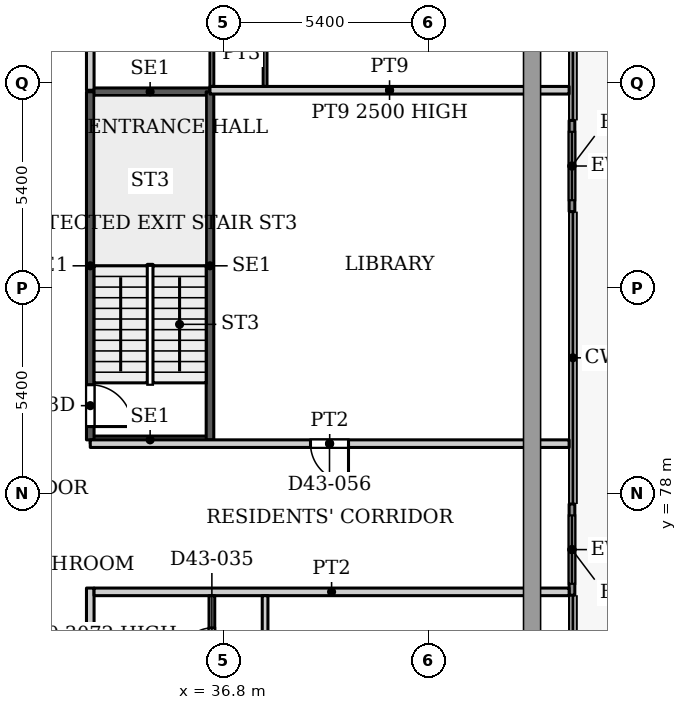
"""IFC4 building model, lengths in metres.
Left out: names, types, materials, properties, quantities, classifications, styles, units other than length and angle.
Written with IfcOpenShell. Run it as: python <this file> out.ifc"""

import sys

from ifc_helpers import new_model, si_unit, direction, frame, frame_2d, origin, place, context, subcontext, project, spatial, rectangle, extrude, source, transform, mapped, element, fill, save


model = new_model("IFC4")
c1 = context("Model", 3, precision=1e-05, world=origin(), true_north=direction((0.0, 1.0)))
c2 = subcontext(c1, "Body", "Model", "MODEL_VIEW")
j1 = project(units=[si_unit("LENGTHUNIT", "METRE"), si_unit("PLANEANGLEUNIT", "RADIAN")], contexts=[c1])
p1 = place(None, origin())
s1 = spatial("IfcSite", under=j1, at=p1, CompositionType="ELEMENT")
p2 = place(p1, origin())
s2 = spatial("IfcBuilding", under=s1, at=p2, CompositionType="ELEMENT")
p3 = place(p2, frame((0.0, 0.0, 191.6)))
s3 = spatial("IfcBuildingStorey", under=s2, at=p3, CompositionType="ELEMENT", Elevation=191.6)
p4 = place(p3, frame((45.975, 87.806, 0.0), z_axis=(0.0, 0.0, 1.0), x_axis=(0.0, -1.0, 0.0)))
e1 = element("IfcWall", 1, at=p4, inside=s3, PredefinedType="SOLIDWALL", context=c2, shape_type="SweptSolid", body=[
    extrude(rectangle(XDim=2.4, YDim=0.15, at=frame_2d((1.2, 0.0))), origin(), (0.0, 0.0, 1.0), 3.75),
])
p5 = place(p4, frame((0.3, 0.0, 0.0)))
e2 = element("IfcOpeningElement", 2, at=p5, cuts=e1, PredefinedType="OPENING", context=c2, shape_type="SweptSolid", body=[
    extrude(rectangle(XDim=1.8, YDim=2.4, at=frame_2d((0.9, 1.2))), frame((0.0, 0.085, 0.0), z_axis=(0.0, -1.0, 0.0), x_axis=(1.0, 0.0, 0.0)), (0.0, 0.0, 1.0), 0.17),
])
p6 = place(p3, frame((45.975, 77.712, 0.0), z_axis=(0.0, 0.0, 1.0), x_axis=(0.0, -1.0, 0.0)))
e3 = element("IfcWall", 3, at=p6, inside=s3, PredefinedType="SOLIDWALL", context=c2, shape_type="SweptSolid", body=[
    extrude(rectangle(XDim=2.4, YDim=0.15, at=frame_2d((1.2, 0.0))), origin(), (0.0, 0.0, 1.0), 3.75),
])
p7 = place(p6, frame((0.3, 0.0, 0.0)))
e4 = element("IfcOpeningElement", 4, at=p7, cuts=e3, PredefinedType="OPENING", context=c2, shape_type="SweptSolid", body=[
    extrude(rectangle(XDim=1.8, YDim=2.4, at=frame_2d((0.9, 1.2))), frame((0.0, 0.085, 0.0), z_axis=(0.0, -1.0, 0.0), x_axis=(1.0, 0.0, 0.0)), (0.0, 0.0, 1.0), 0.17),
])
for number, where, z_axis, x_axis in (
    (5, (33.3, 79.4, 0.0), (0.0, 0.0, 1.0), (1.0, 0.0, 0.0)),
    (6, (33.3, 88.56, 0.0), (0.0, 0.0, 1.0), (1.0, 0.0, 0.0)),
):
    element("IfcWall", number, at=place(p3, frame(where, z_axis=z_axis, x_axis=x_axis)), inside=s3, PredefinedType="SHEAR", context=c2, shape_type="SweptSolid", body=[
        extrude(rectangle(XDim=3.15, YDim=0.2, at=frame_2d((1.575, 0.0))), origin(), (0.0, 0.0, 1.0), 3.9),
    ])
p8 = place(p3, frame((33.3, 79.4, 0.0), z_axis=(0.0, 0.0, 1.0), x_axis=(0.0, 1.0, 0.0)))
e7 = element("IfcWall", 7, at=p8, inside=s3, PredefinedType="SHEAR", context=c2, shape_type="SweptSolid", body=[
    extrude(rectangle(XDim=9.16, YDim=0.2, at=frame_2d((4.58, 0.0))), origin(), (0.0, 0.0, 1.0), 3.9),
])
p9 = place(p8, frame((0.35, 0.0, 0.0)))
e8 = element("IfcOpeningElement", 8, at=p9, cuts=e7, PredefinedType="OPENING", context=c2, shape_type="SweptSolid", body=[
    extrude(rectangle(XDim=1.1, YDim=2.2, at=frame_2d((0.55, 1.1))), frame((0.0, 0.11, 0.0), z_axis=(0.0, -1.0, 0.0), x_axis=(1.0, 0.0, 0.0)), (0.0, 0.0, 1.0), 0.22),
])
p10 = place(p3, frame((36.45, 79.4, 0.0), z_axis=(0.0, 0.0, 1.0), x_axis=(0.0, 1.0, 0.0)))
e9 = element("IfcWall", 9, at=p10, inside=s3, PredefinedType="SHEAR", context=c2, shape_type="SweptSolid", body=[
    extrude(rectangle(XDim=9.16, YDim=0.2, at=frame_2d((4.58, 0.0))), origin(), (0.0, 0.0, 1.0), 3.9),
])
p11 = place(p3, frame((33.3, 57.9, 0.0), z_axis=(0.0, 0.0, 1.0), x_axis=(0.0, 1.0, 0.0)))
e10 = element("IfcWall", 10, at=p11, inside=s3, PredefinedType="PARTITIONING", context=c2, shape_type="SweptSolid", body=[
    extrude(rectangle(XDim=17.6, YDim=0.2, at=frame_2d((8.8, 0.0))), origin(), (0.0, 0.0, 1.0), 3.6),
])
p12 = place(p11, frame((8.9, 0.0, 0.0)))
e11 = element("IfcOpeningElement", 11, at=p12, cuts=e10, PredefinedType="OPENING", context=c2, shape_type="SweptSolid", body=[
    extrude(rectangle(XDim=1.0, YDim=2.1, at=frame_2d((0.5, 1.05))), frame((0.0, 0.11, 0.0), z_axis=(0.0, -1.0, 0.0), x_axis=(1.0, 0.0, 0.0)), (0.0, 0.0, 1.0), 0.22),
])
p13 = place(p3, frame((33.3, 79.3, 0.0), z_axis=(0.0, 0.0, 1.0), x_axis=(1.0, 0.0, 0.0)))
e12 = element("IfcWall", 12, at=p13, inside=s3, PredefinedType="PARTITIONING", context=c2, shape_type="SweptSolid", body=[
    extrude(rectangle(XDim=12.6, YDim=0.2, at=frame_2d((6.3, 0.0))), origin(), (0.0, 0.0, 1.0), 3.6),
])
p14 = place(p13, frame((5.795, 0.0, 0.0)))
e13 = element("IfcOpeningElement", 13, at=p14, cuts=e12, PredefinedType="OPENING", context=c2, shape_type="SweptSolid", body=[
    extrude(rectangle(XDim=1.0, YDim=2.1, at=frame_2d((0.5, 1.05))), frame((0.0, 0.11, 0.0), z_axis=(0.0, -1.0, 0.0), x_axis=(1.0, 0.0, 0.0)), (0.0, 0.0, 1.0), 0.22),
])
p15 = place(p3, frame((33.3, 88.6, 0.0), z_axis=(0.0, 0.0, 1.0), x_axis=(0.0, 1.0, 0.0)))
e14 = element("IfcWall", 14, at=p15, inside=s3, PredefinedType="PARTITIONING", context=c2, shape_type="SweptSolid", body=[
    extrude(rectangle(XDim=5.175, YDim=0.2, at=frame_2d((2.587, 0.0))), origin(), (0.0, 0.0, 1.0), 3.6),
])
p16 = place(p15, frame((3.7, 0.0, 0.0)))
e15 = element("IfcOpeningElement", 15, at=p16, cuts=e14, PredefinedType="OPENING", context=c2, shape_type="SweptSolid", body=[
    extrude(rectangle(XDim=1.0, YDim=2.1, at=frame_2d((0.5, 1.05))), frame((0.0, 0.11, 0.0), z_axis=(0.0, -1.0, 0.0), x_axis=(1.0, 0.0, 0.0)), (0.0, 0.0, 1.0), 0.22),
])
p17 = place(p3, frame((33.4, 75.4, 0.0), z_axis=(0.0, 0.0, 1.0), x_axis=(1.0, 0.0, 0.0)))
e16 = element("IfcWall", 16, at=p17, inside=s3, PredefinedType="PARTITIONING", context=c2, shape_type="SweptSolid", body=[
    extrude(rectangle(XDim=12.5, YDim=0.2, at=frame_2d((6.25, 0.0))), origin(), (0.0, 0.0, 1.0), 3.6),
])
p18 = place(p3, frame((36.45, 88.6, 0.0), z_axis=(0.0, 0.0, 1.0), x_axis=(1.0, 0.0, 0.0)))
e17 = element("IfcWall", 17, at=p18, inside=s3, PredefinedType="PARTITIONING", context=c2, shape_type="SweptSolid", body=[
    extrude(rectangle(XDim=9.45, YDim=0.2, at=frame_2d((4.725, 0.0))), origin(), (0.0, 0.0, 1.0), 2.5),
])
p19 = place(p3, frame((36.5, 68.75, 0.0), z_axis=(0.0, 0.0, 1.0), x_axis=(0.0, 1.0, 0.0)))
e18 = element("IfcWall", 18, at=p19, inside=s3, PredefinedType="PARTITIONING", context=c2, shape_type="SweptSolid", body=[
    extrude(rectangle(XDim=6.55, YDim=0.15, at=frame_2d((3.275, 0.0))), origin(), (0.0, 0.0, 1.0), 3.6),
])
p20 = place(p19, frame((4.9, 0.0, 0.0)))
e19 = element("IfcOpeningElement", 19, at=p20, cuts=e18, PredefinedType="OPENING", context=c2, shape_type="SweptSolid", body=[
    extrude(rectangle(XDim=0.8, YDim=2.1, at=frame_2d((0.4, 1.05))), frame((0.0, 0.085, 0.0), z_axis=(0.0, -1.0, 0.0), x_axis=(1.0, 0.0, 0.0)), (0.0, 0.0, 1.0), 0.17),
])
p21 = place(p19, frame((1.55, 0.0, 0.0)))
e20 = element("IfcOpeningElement", 20, at=p21, cuts=e18, PredefinedType="OPENING", context=c2, shape_type="SweptSolid", body=[
    extrude(rectangle(XDim=0.9, YDim=2.1, at=frame_2d((0.45, 1.05))), frame((0.0, 0.085, 0.0), z_axis=(0.0, -1.0, 0.0), x_axis=(1.0, 0.0, 0.0)), (0.0, 0.0, 1.0), 0.17),
])
p22 = place(p3, frame((36.5, 88.7, 0.0), z_axis=(0.0, 0.0, 1.0), x_axis=(0.0, 1.0, 0.0)))
e21 = element("IfcWall", 21, at=p22, inside=s3, PredefinedType="PARTITIONING", context=c2, shape_type="SweptSolid", body=[
    extrude(rectangle(XDim=3.25, YDim=0.1, at=frame_2d((1.625, 0.0))), origin(), (0.0, 0.0, 1.0), 3.6),
])
p23 = place(p22, frame((1.1, 0.0, 0.0)))
e22 = element("IfcOpeningElement", 22, at=p23, cuts=e21, PredefinedType="OPENING", context=c2, shape_type="SweptSolid", body=[
    extrude(rectangle(XDim=0.9, YDim=2.1, at=frame_2d((0.45, 1.05))), frame((0.0, 0.06, 0.0), z_axis=(0.0, -1.0, 0.0), x_axis=(1.0, 0.0, 0.0)), (0.0, 0.0, 1.0), 0.12),
])
p24 = place(p3, frame((37.9, 58.1, 0.0), z_axis=(0.0, 0.0, 1.0), x_axis=(0.0, 1.0, 0.0)))
e23 = element("IfcWall", 23, at=p24, inside=s3, PredefinedType="PARTITIONING", context=c2, shape_type="SweptSolid", body=[
    extrude(rectangle(XDim=17.2, YDim=0.15, at=frame_2d((8.6, 0.0))), origin(), (0.0, 0.0, 1.0), 3.6),
])
p25 = place(p24, frame((0.95, 0.0, 0.0)))
e24 = element("IfcOpeningElement", 24, at=p25, cuts=e23, PredefinedType="OPENING", context=c2, shape_type="SweptSolid", body=[
    extrude(rectangle(XDim=0.9, YDim=2.1, at=frame_2d((0.45, 1.05))), frame((0.0, 0.085, 0.0), z_axis=(0.0, -1.0, 0.0), x_axis=(1.0, 0.0, 0.0)), (0.0, 0.0, 1.0), 0.17),
])
p26 = place(p24, frame((15.2, 0.0, 0.0)))
e25 = element("IfcOpeningElement", 25, at=p26, cuts=e23, PredefinedType="OPENING", context=c2, shape_type="SweptSolid", body=[
    extrude(rectangle(XDim=0.9, YDim=2.1, at=frame_2d((0.45, 1.05))), frame((0.0, 0.085, 0.0), z_axis=(0.0, -1.0, 0.0), x_axis=(1.0, 0.0, 0.0)), (0.0, 0.0, 1.0), 0.17),
])
p27 = place(p24, frame((9.0, 0.0, 0.0)))
e26 = element("IfcOpeningElement", 26, at=p27, cuts=e23, PredefinedType="OPENING", context=c2, shape_type="SweptSolid", body=[
    extrude(rectangle(XDim=1.0, YDim=2.1, at=frame_2d((0.5, 1.05))), frame((0.0, 0.085, 0.0), z_axis=(0.0, -1.0, 0.0), x_axis=(1.0, 0.0, 0.0)), (0.0, 0.0, 1.0), 0.17),
])
p28 = place(p24, frame((12.2, 0.0, 0.0)))
e27 = element("IfcOpeningElement", 27, at=p28, cuts=e23, PredefinedType="OPENING", context=c2, shape_type="SweptSolid", body=[
    extrude(rectangle(XDim=0.9, YDim=2.1, at=frame_2d((0.45, 1.05))), frame((0.0, 0.085, 0.0), z_axis=(0.0, -1.0, 0.0), x_axis=(1.0, 0.0, 0.0)), (0.0, 0.0, 1.0), 0.17),
])
p29 = place(p24, frame((3.8, 0.0, 0.0)))
e28 = element("IfcOpeningElement", 28, at=p29, cuts=e23, PredefinedType="OPENING", context=c2, shape_type="SweptSolid", body=[
    extrude(rectangle(XDim=0.9, YDim=2.1, at=frame_2d((0.45, 1.05))), frame((0.0, 0.085, 0.0), z_axis=(0.0, -1.0, 0.0), x_axis=(1.0, 0.0, 0.0)), (0.0, 0.0, 1.0), 0.17),
])
p30 = place(p3, frame((37.9, 88.7, 0.0), z_axis=(0.0, 0.0, 1.0), x_axis=(0.0, 1.0, 0.0)))
e29 = element("IfcWall", 29, at=p30, inside=s3, PredefinedType="PARTITIONING", context=c2, shape_type="SweptSolid", body=[
    extrude(rectangle(XDim=9.2, YDim=0.1, at=frame_2d((4.6, 0.0))), origin(), (0.0, 0.0, 1.0), 3.6),
])
p31 = place(p30, frame((1.4, 0.0, 0.0)))
e30 = element("IfcOpeningElement", 30, at=p31, cuts=e29, PredefinedType="OPENING", context=c2, shape_type="SweptSolid", body=[
    extrude(rectangle(XDim=0.9, YDim=2.1, at=frame_2d((0.45, 1.05))), frame((0.0, 0.06, 0.0), z_axis=(0.0, -1.0, 0.0), x_axis=(1.0, 0.0, 0.0)), (0.0, 0.0, 1.0), 0.12),
])
p32 = place(p30, frame((6.0, 0.0, 0.0)))
e31 = element("IfcOpeningElement", 31, at=p32, cuts=e29, PredefinedType="OPENING", context=c2, shape_type="SweptSolid", body=[
    extrude(rectangle(XDim=1.0, YDim=2.1, at=frame_2d((0.5, 1.05))), frame((0.0, 0.06, 0.0), z_axis=(0.0, -1.0, 0.0), x_axis=(1.0, 0.0, 0.0)), (0.0, 0.0, 1.0), 0.12),
])
m1 = source(origin(), c2, "Body", "SweptSolid", [
    extrude(rectangle(XDim=1.8, YDim=2.4, at=frame_2d((0.9, 1.2))), frame((0.0, 0.025, 0.0), z_axis=(0.0, -1.0, 0.0), x_axis=(1.0, 0.0, 0.0)), (0.0, 0.0, 1.0), 0.05),
])
p33 = place(p5, origin())
e32 = element("IfcDoor", 32, at=p33, inside=s3, OperationType="SLIDING_TO_LEFT", PredefinedType="DOOR", context=c2, shape_type="MappedRepresentation", body=[
    mapped(m1, transform((0.0, 0.0, 0.0), x_axis=(1.0, 0.0, 0.0), y_axis=(0.0, 1.0, 0.0), z_axis=(0.0, 0.0, 1.0), scale=1.0)),
])
fill(e2, e32)
p34 = place(p7, origin())
e33 = element("IfcDoor", 33, at=p34, inside=s3, OperationType="SLIDING_TO_LEFT", PredefinedType="DOOR", context=c2, shape_type="MappedRepresentation", body=[
    mapped(m1, transform((0.0, 0.0, 0.0), x_axis=(1.0, 0.0, 0.0), y_axis=(0.0, 1.0, 0.0), z_axis=(0.0, 0.0, 1.0), scale=1.0)),
])
fill(e4, e33)
m2 = source(origin(), c2, "Body", "SweptSolid", [
    extrude(rectangle(XDim=1.1, YDim=2.2, at=frame_2d((0.55, 1.1))), frame((0.0, 0.025, 0.0), z_axis=(0.0, -1.0, 0.0), x_axis=(1.0, 0.0, 0.0)), (0.0, 0.0, 1.0), 0.05),
])
p35 = place(p9, origin())
e34 = element("IfcDoor", 34, at=p35, inside=s3, OperationType="SINGLE_SWING_RIGHT", PredefinedType="DOOR", context=c2, shape_type="MappedRepresentation", body=[
    mapped(m2, transform((0.0, 0.0, 0.0), x_axis=(1.0, 0.0, 0.0), y_axis=(0.0, 1.0, 0.0), z_axis=(0.0, 0.0, 1.0), scale=1.0)),
])
fill(e8, e34)
m3 = source(origin(), c2, "Body", "SweptSolid", [
    extrude(rectangle(XDim=0.8, YDim=2.1, at=frame_2d((0.4, 1.05))), frame((0.0, 0.025, 0.0), z_axis=(0.0, -1.0, 0.0), x_axis=(1.0, 0.0, 0.0)), (0.0, 0.0, 1.0), 0.05),
])
p36 = place(p20, origin())
e35 = element("IfcDoor", 35, at=p36, inside=s3, OperationType="SINGLE_SWING_LEFT", PredefinedType="DOOR", context=c2, shape_type="MappedRepresentation", body=[
    mapped(m3, transform((0.0, 0.0, 0.0), x_axis=(1.0, 0.0, 0.0), y_axis=(0.0, 1.0, 0.0), z_axis=(0.0, 0.0, 1.0), scale=1.0)),
])
fill(e19, e35)
m4 = source(origin(), c2, "Body", "SweptSolid", [
    extrude(rectangle(XDim=1.0, YDim=2.1, at=frame_2d((0.5, 1.05))), frame((0.0, 0.025, 0.0), z_axis=(0.0, -1.0, 0.0), x_axis=(1.0, 0.0, 0.0)), (0.0, 0.0, 1.0), 0.05),
])
p37 = place(p14, origin())
e36 = element("IfcDoor", 36, at=p37, inside=s3, OperationType="SINGLE_SWING_RIGHT", PredefinedType="DOOR", context=c2, shape_type="MappedRepresentation", body=[
    mapped(m4, transform((0.0, 0.0, 0.0), x_axis=(1.0, 0.0, 0.0), y_axis=(0.0, 1.0, 0.0), z_axis=(0.0, 0.0, 1.0), scale=1.0)),
])
fill(e13, e36)
save(model, sys.argv[1])
